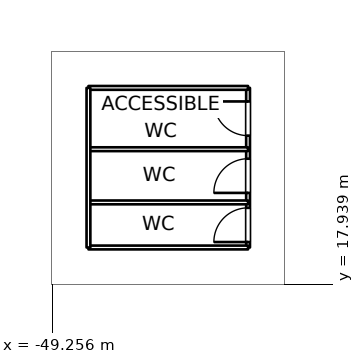
"""IFC4 building model, lengths in metres.
Left out: names, types, materials, properties, quantities, classifications, styles, units other than length and angle.
Written with IfcOpenShell. Run it as: python <this file> out.ifc"""

import sys

from ifc_helpers import new_model, si_unit, direction, frame, frame_2d, origin, place, context, subcontext, project, spatial, rectangle, extrude, element, fill, save


model = new_model("IFC4")
c1 = context("Model", 3, precision=1e-05, world=origin(), true_north=direction((0.0, 1.0)))
c2 = subcontext(c1, "Body", "Model", "MODEL_VIEW")
j1 = project(units=[si_unit("LENGTHUNIT", "METRE"), si_unit("PLANEANGLEUNIT", "RADIAN")], contexts=[c1])
p1 = place(None, origin())
s1 = spatial("IfcSite", under=j1, at=p1, CompositionType="ELEMENT")
p2 = place(p1, origin())
s2 = spatial("IfcBuilding", under=s1, at=p2, CompositionType="ELEMENT")
p3 = place(p2, frame((0.0, 0.0, 16.0)))
s3 = spatial("IfcBuildingStorey", under=s2, at=p3, CompositionType="ELEMENT", Elevation=16.0)
p4 = place(p3, frame((-48.3, 18.9, 0.0), z_axis=(0.0, 0.0, 1.0), x_axis=(1.0, 0.0, 0.0)))
e1 = element("IfcWall", 1, at=p4, inside=s3, PredefinedType="PARTITIONING", context=c2, shape_type="SweptSolid", body=[
    extrude(rectangle(XDim=4.2, YDim=0.1, at=frame_2d((2.1, 0.0))), origin(), (0.0, 0.0, 1.0), 4.7),
])
p5 = place(p3, frame((-44.1, 18.9, 0.0), z_axis=(0.0, 0.0, 1.0), x_axis=(0.0, 1.0, 0.0)))
e2 = element("IfcWall", 2, at=p5, inside=s3, PredefinedType="PARTITIONING", context=c2, shape_type="SweptSolid", body=[
    extrude(rectangle(XDim=4.2, YDim=0.1, at=frame_2d((2.1, 0.0))), origin(), (0.0, 0.0, 1.0), 4.7),
])
p6 = place(p5, frame((0.143, 0.0, 0.0)))
e3 = element("IfcOpeningElement", 3, at=p6, cuts=e2, PredefinedType="OPENING", context=c2, shape_type="SweptSolid", body=[
    extrude(rectangle(XDim=0.9, YDim=2.1, at=frame_2d((0.45, 1.05))), frame((0.0, 0.06, 0.0), z_axis=(0.0, -1.0, 0.0), x_axis=(1.0, 0.0, 0.0)), (0.0, 0.0, 1.0), 0.12),
])
p7 = place(p5, frame((1.437, 0.0, 0.0)))
e4 = element("IfcOpeningElement", 4, at=p7, cuts=e2, PredefinedType="OPENING", context=c2, shape_type="SweptSolid", body=[
    extrude(rectangle(XDim=0.9, YDim=2.1, at=frame_2d((0.45, 1.05))), frame((0.0, 0.06, 0.0), z_axis=(0.0, -1.0, 0.0), x_axis=(1.0, 0.0, 0.0)), (0.0, 0.0, 1.0), 0.12),
])
p8 = place(p5, frame((2.943, 0.0, 0.0)))
e5 = element("IfcOpeningElement", 5, at=p8, cuts=e2, PredefinedType="OPENING", context=c2, shape_type="SweptSolid", body=[
    extrude(rectangle(XDim=0.9, YDim=2.1, at=frame_2d((0.45, 1.05))), frame((0.0, 0.06, 0.0), z_axis=(0.0, -1.0, 0.0), x_axis=(1.0, 0.0, 0.0)), (0.0, 0.0, 1.0), 0.12),
])
p9 = place(p3, frame((-44.1, 23.1, 0.0), z_axis=(0.0, 0.0, 1.0), x_axis=(-1.0, 0.0, 0.0)))
e6 = element("IfcWall", 6, at=p9, inside=s3, PredefinedType="PARTITIONING", context=c2, shape_type="SweptSolid", body=[
    extrude(rectangle(XDim=4.2, YDim=0.1, at=frame_2d((2.1, 0.0))), origin(), (0.0, 0.0, 1.0), 4.7),
])
p10 = place(p3, frame((-48.3, 23.1, 0.0), z_axis=(0.0, 0.0, 1.0), x_axis=(0.0, -1.0, 0.0)))
e7 = element("IfcWall", 7, at=p10, inside=s3, PredefinedType="PARTITIONING", context=c2, shape_type="SweptSolid", body=[
    extrude(rectangle(XDim=4.2, YDim=0.1, at=frame_2d((2.1, 0.0))), origin(), (0.0, 0.0, 1.0), 4.7),
])
for number, where, z_axis, x_axis in (
    (8, (-48.3, 20.086, 0.0), (0.0, 0.0, 1.0), (1.0, 0.0, 0.0)),
    (9, (-48.3, 21.486, 0.0), (0.0, 0.0, 1.0), (1.0, 0.0, 0.0)),
):
    element("IfcWall", number, at=place(p3, frame(where, z_axis=z_axis, x_axis=x_axis)), inside=s3, PredefinedType="PARTITIONING", context=c2, shape_type="SweptSolid", body=[
        extrude(rectangle(XDim=4.2, YDim=0.1, at=frame_2d((2.1, 0.0))), origin(), (0.0, 0.0, 1.0), 4.7),
    ])
p11 = place(p6, origin())
e10 = element("IfcDoor", 10, at=p11, inside=s3, OperationType="SINGLE_SWING_LEFT", PredefinedType="DOOR", context=c2, shape_type="SweptSolid", body=[
    extrude(rectangle(XDim=0.9, YDim=2.1, at=frame_2d((0.45, 1.05))), frame((0.0, 0.025, 0.0), z_axis=(0.0, -1.0, 0.0), x_axis=(1.0, 0.0, 0.0)), (0.0, 0.0, 1.0), 0.05),
])
fill(e3, e10)
p12 = place(p7, origin())
e11 = element("IfcDoor", 11, at=p12, inside=s3, OperationType="SINGLE_SWING_LEFT", PredefinedType="DOOR", context=c2, shape_type="SweptSolid", body=[
    extrude(rectangle(XDim=0.9, YDim=2.1, at=frame_2d((0.45, 1.05))), frame((0.0, 0.025, 0.0), z_axis=(0.0, -1.0, 0.0), x_axis=(1.0, 0.0, 0.0)), (0.0, 0.0, 1.0), 0.05),
])
fill(e4, e11)
p13 = place(p8, origin())
e12 = element("IfcDoor", 12, at=p13, inside=s3, OperationType="SINGLE_SWING_RIGHT", PredefinedType="DOOR", context=c2, shape_type="SweptSolid", body=[
    extrude(rectangle(XDim=0.9, YDim=2.1, at=frame_2d((0.45, 1.05))), frame((0.0, 0.025, 0.0), z_axis=(0.0, -1.0, 0.0), x_axis=(1.0, 0.0, 0.0)), (0.0, 0.0, 1.0), 0.05),
])
fill(e5, e12)
save(model, sys.argv[1])
